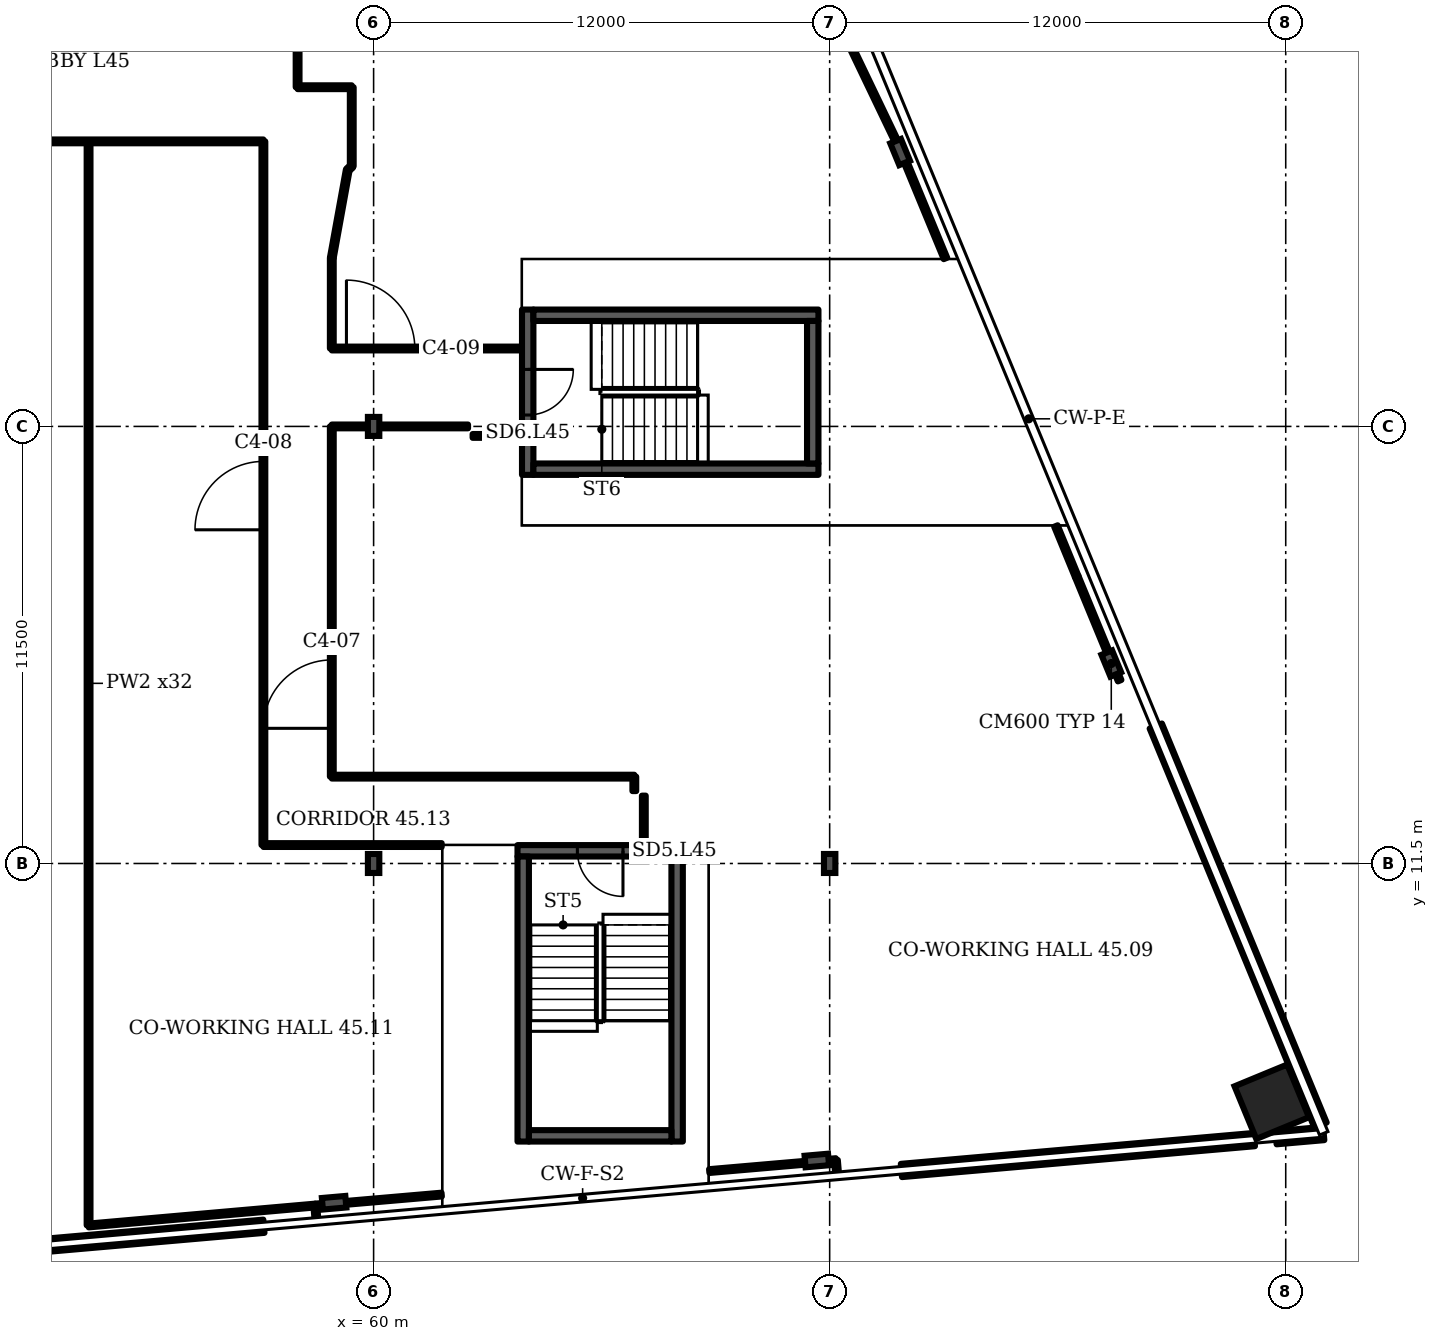
"""IFC4 building model, lengths in metres.
Left out: names, types, materials, properties, quantities, classifications, styles, units other than length and angle.
Written with IfcOpenShell. Run it as: python <this file> out.ifc"""

import sys

from ifc_helpers import new_model, si_unit, direction, frame, frame_2d, origin, origin_2d, place, context, subcontext, project, spatial, rectangle, i_section, extrude, element, fill, save


model = new_model("IFC4")
c1 = context("Model", 3, precision=1e-05, world=origin(), true_north=direction((0.0, 1.0)))
c2 = subcontext(c1, "Body", "Model", "MODEL_VIEW")
j1 = project(units=[si_unit("LENGTHUNIT", "METRE"), si_unit("PLANEANGLEUNIT", "RADIAN")], contexts=[c1])
p1 = place(None, origin())
s1 = spatial("IfcSite", under=j1, at=p1, CompositionType="ELEMENT")
p2 = place(p1, origin())
s2 = spatial("IfcBuilding", under=s1, at=p2, CompositionType="ELEMENT")
p3 = place(p2, frame((0.0, 0.0, 184.3)))
s3 = spatial("IfcBuildingStorey", under=s2, at=p3, CompositionType="ELEMENT", Elevation=184.3)
p4 = place(p3, frame((83.633, 5.231, 0.0), z_axis=(0.0, 0.0, 1.0), x_axis=(-0.381602, 0.924325, 0.0)))
e1 = element("IfcColumn", 1, at=p4, inside=s3, PredefinedType="COLUMN", context=c2, shape_type="SweptSolid", body=[
    extrude(rectangle(XDim=1.5, YDim=1.5, at=origin_2d()), origin(), (0.0, 0.0, 1.0), 3.6),
])
for number, where, z_axis, x_axis in (
    (2, (58.961, 2.573, 0.0), (0.0, 0.0, 1.0), (0.087, -0.996, 0.0)),
    (3, (71.662, 3.685, 0.0), (0.0, 0.0, 1.0), (0.087, -0.996, 0.0)),
    (4, (79.41, 16.762, 0.0), (0.0, 0.0, 1.0), (0.924, 0.382, 0.0)),
    (5, (73.854, 30.219, 0.0), (0.0, 0.0, 1.0), (0.924, 0.382, 0.0)),
):
    element("IfcColumn", number, at=place(p3, frame(where, z_axis=z_axis, x_axis=x_axis)), inside=s3, PredefinedType="COLUMN", context=c2, shape_type="SweptSolid", body=[
        extrude(i_section(OverallWidth=0.305, OverallDepth=0.62, WebThickness=0.021, FlangeThickness=0.04, FilletRadius=0.027, at=origin_2d()), origin(), (0.0, 0.0, 1.0), 3.6),
    ])
for number, where, z_axis, x_axis in (
    (6, (60.0, 11.5, 0.0), (0.0, 0.0, 1.0), (1.0, 0.0, 0.0)),
    (7, (72.0, 11.5, 0.0), (0.0, 0.0, 1.0), (1.0, 0.0, 0.0)),
    (8, (60.0, 23.0, 0.0), (0.0, 0.0, 1.0), (1.0, 0.0, 0.0)),
):
    element("IfcColumn", number, at=place(p3, frame(where, z_axis=z_axis, x_axis=x_axis)), inside=s3, PredefinedType="COLUMN", context=c2, shape_type="SweptSolid", body=[
        extrude(i_section(OverallWidth=0.3, OverallDepth=0.5, WebThickness=0.014, FlangeThickness=0.028, FilletRadius=0.027, at=origin_2d()), origin(), (0.0, 0.0, 1.0), 3.6),
    ])
p5 = place(p3, frame((46.045, 0.987, 0.0), z_axis=(0.0, 0.0, 1.0), x_axis=(0.996193, 0.087171, 0.0)))
e9 = element("IfcWall", 9, at=p5, inside=s3, PredefinedType="SOLIDWALL", context=c2, shape_type="SweptSolid", body=[
    extrude(rectangle(XDim=11.11, YDim=0.35, at=frame_2d((5.555, 0.0))), origin(), (0.0, 0.0, 1.0), 1.0),
])
p6 = place(p3, frame((73.887, 3.423, 0.0), z_axis=(0.0, 0.0, 1.0), x_axis=(0.996197, 0.087145, 0.0)))
e10 = element("IfcWall", 10, at=p6, inside=s3, PredefinedType="SOLIDWALL", context=c2, shape_type="SweptSolid", body=[
    extrude(rectangle(XDim=9.323, YDim=0.35, at=frame_2d((4.662, 0.0))), origin(), (0.0, 0.0, 1.0), 1.0),
])
p7 = place(p3, frame((83.745, 4.285, 0.0), z_axis=(0.0, 0.0, 1.0), x_axis=(0.996198, 0.087148, 0.0)))
e11 = element("IfcWall", 11, at=p7, inside=s3, PredefinedType="SOLIDWALL", context=c2, shape_type="SweptSolid", body=[
    extrude(rectangle(XDim=1.261, YDim=0.35, at=frame_2d((0.63, 0.0))), origin(), (0.0, 0.0, 1.0), 1.0),
])
p8 = place(p3, frame((84.916, 4.616, 0.0), z_axis=(0.0, 0.0, 1.0), x_axis=(-0.381598, 0.924328, 0.0)))
e12 = element("IfcWall", 12, at=p8, inside=s3, PredefinedType="SOLIDWALL", context=c2, shape_type="SweptSolid", body=[
    extrude(rectangle(XDim=11.361, YDim=0.35, at=frame_2d((5.68, 0.0))), origin(), (0.0, 0.0, 1.0), 1.0),
])
p9 = place(p3, frame((63.786, 11.834, 0.0), z_axis=(0.0, 0.0, 1.0), x_axis=(1.0, 0.0, 0.0)))
e13 = element("IfcWall", 13, at=p9, inside=s3, PredefinedType="SHEAR", context=c2, shape_type="SweptSolid", body=[
    extrude(rectangle(XDim=4.35, YDim=0.3, at=frame_2d((2.175, 0.0))), origin(), (0.0, 0.0, 1.0), 3.2),
])
p10 = place(p9, frame((1.575, 0.0, 0.0)))
e14 = element("IfcOpeningElement", 14, at=p10, cuts=e13, PredefinedType="OPENING", context=c2, shape_type="SweptSolid", body=[
    extrude(rectangle(XDim=1.2, YDim=2.1, at=frame_2d((0.6, 1.05))), frame((0.0, 0.16, 0.0), z_axis=(0.0, -1.0, 0.0), x_axis=(1.0, 0.0, 0.0)), (0.0, 0.0, 1.0), 0.32),
])
p11 = place(p3, frame((64.055, 21.725, 0.0), z_axis=(0.0, 0.0, 1.0), x_axis=(0.0, 1.0, 0.0)))
e15 = element("IfcWall", 15, at=p11, inside=s3, PredefinedType="SHEAR", context=c2, shape_type="SweptSolid", body=[
    extrude(rectangle(XDim=4.35, YDim=0.3, at=frame_2d((2.175, 0.0))), origin(), (0.0, 0.0, 1.0), 3.2),
])
p12 = place(p11, frame((1.575, 0.0, 0.0)))
e16 = element("IfcOpeningElement", 16, at=p12, cuts=e15, PredefinedType="OPENING", context=c2, shape_type="SweptSolid", body=[
    extrude(rectangle(XDim=1.2, YDim=2.1, at=frame_2d((0.6, 1.05))), frame((0.0, 0.16, 0.0), z_axis=(0.0, -1.0, 0.0), x_axis=(1.0, 0.0, 0.0)), (0.0, 0.0, 1.0), 0.32),
])
p13 = place(p3, frame((52.5, 1.98, 0.0), z_axis=(0.0, 0.0, 1.0), x_axis=(0.0, 1.0, 0.0)))
e17 = element("IfcWall", 17, at=p13, inside=s3, PredefinedType="PARTITIONING", context=c2, shape_type="SweptSolid", body=[
    extrude(rectangle(XDim=28.52, YDim=0.1, at=frame_2d((14.26, 0.0))), origin(), (0.0, 0.0, 1.0), 3.2),
])
p14 = place(p3, frame((52.5, 1.975, 0.0), z_axis=(0.0, 0.0, 1.0), x_axis=(0.99615, 0.087657, 0.0)))
e18 = element("IfcWall", 18, at=p14, inside=s3, PredefinedType="PARTITIONING", context=c2, shape_type="SweptSolid", body=[
    extrude(rectangle(XDim=5.988, YDim=0.1, at=frame_2d((2.994, 0.0))), origin(), (0.0, 0.0, 1.0), 3.2),
])
p15 = place(p3, frame((57.1, 11.985, 0.0), z_axis=(0.0, 0.0, 1.0), x_axis=(0.0, 1.0, 0.0)))
e19 = element("IfcWall", 19, at=p15, inside=s3, PredefinedType="PARTITIONING", context=c2, shape_type="SweptSolid", body=[
    extrude(rectangle(XDim=18.515, YDim=0.1, at=frame_2d((9.257, 0.0))), origin(), (0.0, 0.0, 1.0), 3.2),
])
p16 = place(p15, frame((8.295, 0.0, 0.0)))
e20 = element("IfcOpeningElement", 20, at=p16, cuts=e19, PredefinedType="OPENING", context=c2, shape_type="SweptSolid", body=[
    extrude(rectangle(XDim=1.8, YDim=2.1, at=frame_2d((0.9, 1.05))), frame((0.0, 0.06, 0.0), z_axis=(0.0, -1.0, 0.0), x_axis=(1.0, 0.0, 0.0)), (0.0, 0.0, 1.0), 0.12),
])
p17 = place(p3, frame((57.1, 11.985, 0.0), z_axis=(0.0, 0.0, 1.0), x_axis=(1.0, 0.0, 0.0)))
e21 = element("IfcWall", 21, at=p17, inside=s3, PredefinedType="PARTITIONING", context=c2, shape_type="SweptSolid", body=[
    extrude(rectangle(XDim=4.691, YDim=0.1, at=frame_2d((2.346, 0.0))), origin(), (0.0, 0.0, 1.0), 3.2),
])
p18 = place(p3, frame((58.0, 31.925, 0.0), z_axis=(0.0, 0.0, 1.0), x_axis=(0.0, 1.0, 0.0)))
e22 = element("IfcWall", 22, at=p18, inside=s3, PredefinedType="PARTITIONING", context=c2, shape_type="SweptSolid", body=[
    extrude(rectangle(XDim=2.055, YDim=0.1, at=frame_2d((1.027, 0.0))), origin(), (0.0, 0.0, 1.0), 3.2),
])
p19 = place(p3, frame((58.0, 31.925, 0.0), z_axis=(0.0, 0.0, 1.0), x_axis=(1.0, 0.0, 0.0)))
e23 = element("IfcWall", 23, at=p19, inside=s3, PredefinedType="PARTITIONING", context=c2, shape_type="SweptSolid", body=[
    extrude(rectangle(XDim=1.425, YDim=0.1, at=frame_2d((0.712, 0.0))), origin(), (0.0, 0.0, 1.0), 3.2),
])
p20 = place(p3, frame((58.465, 2.5, 0.0), z_axis=(0.0, 0.0, 1.0), x_axis=(0.996263, 0.086355, 0.0)))
e24 = element("IfcWall", 24, at=p20, inside=s3, PredefinedType="PARTITIONING", context=c2, shape_type="SweptSolid", body=[
    extrude(rectangle(XDim=3.339, YDim=0.1, at=frame_2d((1.669, 0.0))), origin(), (0.0, 0.0, 1.0), 2.58),
])
p21 = place(p3, frame((58.498, 2.102, 0.0), z_axis=(0.0, 0.0, 1.0), x_axis=(-0.083045, 0.996542, 0.0)))
e25 = element("IfcWall", 25, at=p21, inside=s3, PredefinedType="PARTITIONING", context=c2, shape_type="SweptSolid", body=[
    extrude(rectangle(XDim=0.4, YDim=0.1, at=frame_2d((0.2, 0.0))), origin(), (0.0, 0.0, 1.0), 3.2),
])
p22 = place(p3, frame((58.9, 13.785, 0.0), z_axis=(0.0, 0.0, 1.0), x_axis=(0.0, 1.0, 0.0)))
e26 = element("IfcWall", 26, at=p22, inside=s3, PredefinedType="PARTITIONING", context=c2, shape_type="SweptSolid", body=[
    extrude(rectangle(XDim=9.215, YDim=0.1, at=frame_2d((4.607, 0.0))), origin(), (0.0, 0.0, 1.0), 3.2),
])
p23 = place(p22, frame((1.271, 0.0, 0.0)))
e27 = element("IfcOpeningElement", 27, at=p23, cuts=e26, PredefinedType="OPENING", context=c2, shape_type="SweptSolid", body=[
    extrude(rectangle(XDim=1.8, YDim=2.1, at=frame_2d((0.9, 1.05))), frame((0.0, 0.06, 0.0), z_axis=(0.0, -1.0, 0.0), x_axis=(1.0, 0.0, 0.0)), (0.0, 0.0, 1.0), 0.12),
])
p24 = place(p3, frame((58.9, 13.785, 0.0), z_axis=(0.0, 0.0, 1.0), x_axis=(1.0, 0.0, 0.0)))
e28 = element("IfcWall", 28, at=p24, inside=s3, PredefinedType="PARTITIONING", context=c2, shape_type="SweptSolid", body=[
    extrude(rectangle(XDim=7.96, YDim=0.1, at=frame_2d((3.98, 0.0))), origin(), (0.0, 0.0, 1.0), 3.2),
])
p25 = place(p3, frame((58.9, 23.0, 0.0), z_axis=(0.0, 0.0, 1.0), x_axis=(1.0, 0.0, 0.0)))
e29 = element("IfcWall", 29, at=p25, inside=s3, PredefinedType="PARTITIONING", context=c2, shape_type="SweptSolid", body=[
    extrude(rectangle(XDim=3.585, YDim=0.1, at=frame_2d((1.792, 0.0))), origin(), (0.0, 0.0, 1.0), 3.2),
])
p26 = place(p3, frame((58.9, 25.05, 0.0), z_axis=(0.0, 0.0, 1.0), x_axis=(0.0, 1.0, 0.0)))
e30 = element("IfcWall", 30, at=p26, inside=s3, PredefinedType="PARTITIONING", context=c2, shape_type="SweptSolid", body=[
    extrude(rectangle(XDim=2.385, YDim=0.1, at=frame_2d((1.192, 0.0))), origin(), (0.0, 0.0, 1.0), 3.2),
])
p27 = place(p3, frame((58.9, 25.05, 0.0), z_axis=(0.0, 0.0, 1.0), x_axis=(1.0, 0.0, 0.0)))
e31 = element("IfcWall", 31, at=p27, inside=s3, PredefinedType="PARTITIONING", context=c2, shape_type="SweptSolid", body=[
    extrude(rectangle(XDim=4.985, YDim=0.1, at=frame_2d((2.492, 0.0))), origin(), (0.0, 0.0, 1.0), 3.2),
])
p28 = place(p27, frame((0.385, 0.0, 0.0)))
e32 = element("IfcOpeningElement", 32, at=p28, cuts=e31, PredefinedType="OPENING", context=c2, shape_type="SweptSolid", body=[
    extrude(rectangle(XDim=1.8, YDim=2.1, at=frame_2d((0.9, 1.05))), frame((0.0, 0.06, 0.0), z_axis=(0.0, -1.0, 0.0), x_axis=(1.0, 0.0, 0.0)), (0.0, 0.0, 1.0), 0.12),
])
p29 = place(p3, frame((58.9, 27.435, 0.0), z_axis=(0.0, 0.0, 1.0), x_axis=(0.178584, 0.983924, 0.0)))
e33 = element("IfcWall", 33, at=p29, inside=s3, PredefinedType="PARTITIONING", context=c2, shape_type="SweptSolid", body=[
    extrude(rectangle(XDim=2.353, YDim=0.1, at=frame_2d((1.176, 0.0))), origin(), (0.0, 0.0, 1.0), 3.2),
])
p30 = place(p3, frame((59.32, 29.75, 0.0), z_axis=(0.0, 0.0, 1.0), x_axis=(0.741581, 0.670872, 0.0)))
e34 = element("IfcWall", 34, at=p30, inside=s3, PredefinedType="PARTITIONING", context=c2, shape_type="SweptSolid", body=[
    extrude(rectangle(XDim=0.142, YDim=0.1, at=frame_2d((0.071, 0.0))), origin(), (0.0, 0.0, 1.0), 3.2),
])
p31 = place(p3, frame((59.425, 29.845, 0.0), z_axis=(0.0, 0.0, 1.0), x_axis=(0.0, 1.0, 0.0)))
e35 = element("IfcWall", 35, at=p31, inside=s3, PredefinedType="PARTITIONING", context=c2, shape_type="SweptSolid", body=[
    extrude(rectangle(XDim=2.08, YDim=0.1, at=frame_2d((1.04, 0.0))), origin(), (0.0, 0.0, 1.0), 3.2),
])
p32 = place(p3, frame((62.605, 22.75, 0.0), z_axis=(0.0, 0.0, 1.0), x_axis=(1.0, 0.0, 0.0)))
e36 = element("IfcWall", 36, at=p32, inside=s3, PredefinedType="PARTITIONING", context=c2, shape_type="SweptSolid", body=[
    extrude(rectangle(XDim=1.28, YDim=0.1, at=frame_2d((0.64, 0.0))), origin(), (0.0, 0.0, 1.0), 3.2),
])
p33 = place(p3, frame((66.86, 13.405, 0.0), z_axis=(0.0, 0.0, 1.0), x_axis=(0.0, 1.0, 0.0)))
e37 = element("IfcWall", 37, at=p33, inside=s3, PredefinedType="PARTITIONING", context=c2, shape_type="SweptSolid", body=[
    extrude(rectangle(XDim=0.38, YDim=0.1, at=frame_2d((0.19, 0.0))), origin(), (0.0, 0.0, 1.0), 3.2),
])
p34 = place(p3, frame((67.11, 12.004, 0.0), z_axis=(0.0, 0.0, 1.0), x_axis=(0.0, 1.0, 0.0)))
e38 = element("IfcWall", 38, at=p34, inside=s3, PredefinedType="PARTITIONING", context=c2, shape_type="SweptSolid", body=[
    extrude(rectangle(XDim=1.281, YDim=0.1, at=frame_2d((0.641, 0.0))), origin(), (0.0, 0.0, 1.0), 3.2),
])
p35 = place(p3, frame((68.831, 3.407, 0.0), z_axis=(0.0, 0.0, 1.0), x_axis=(0.996283, 0.086167, 0.0)))
e39 = element("IfcWall", 39, at=p35, inside=s3, PredefinedType="PARTITIONING", context=c2, shape_type="SweptSolid", body=[
    extrude(rectangle(XDim=3.346, YDim=0.1, at=frame_2d((1.673, 0.0))), origin(), (0.0, 0.0, 1.0), 2.58),
])
p36 = place(p3, frame((72.198, 3.3, 0.0), z_axis=(0.0, 0.0, 1.0), x_axis=(-0.083759, 0.996486, 0.0)))
e40 = element("IfcWall", 40, at=p36, inside=s3, PredefinedType="PARTITIONING", context=c2, shape_type="SweptSolid", body=[
    extrude(rectangle(XDim=0.396, YDim=0.1, at=frame_2d((0.198, 0.0))), origin(), (0.0, 0.0, 1.0), 3.2),
])
p37 = place(p3, frame((73.885, 30.23, 0.0), z_axis=(0.0, 0.0, 1.0), x_axis=(-0.432221, 0.901772, 0.0)))
e41 = element("IfcWall", 41, at=p37, inside=s3, PredefinedType="PARTITIONING", context=c2, shape_type="SweptSolid", body=[
    extrude(rectangle(XDim=12.459, YDim=0.1, at=frame_2d((6.229, 0.0))), origin(), (0.0, 0.0, 1.0), 3.2),
])
p38 = place(p3, frame((75.047, 27.42, 0.0), z_axis=(0.0, 0.0, 1.0), x_axis=(-0.382024, 0.924148, 0.0)))
e42 = element("IfcWall", 42, at=p38, inside=s3, PredefinedType="PARTITIONING", context=c2, shape_type="SweptSolid", body=[
    extrude(rectangle(XDim=3.041, YDim=0.1, at=frame_2d((1.521, 0.0))), origin(), (0.0, 0.0, 1.0), 2.58),
])
p39 = place(p3, frame((78.5, 19.05, 0.0), z_axis=(0.0, 0.0, 1.0), x_axis=(-0.380332, 0.924852, 0.0)))
e43 = element("IfcWall", 43, at=p39, inside=s3, PredefinedType="PARTITIONING", context=c2, shape_type="SweptSolid", body=[
    extrude(rectangle(XDim=1.438, YDim=0.1, at=frame_2d((0.719, 0.0))), origin(), (0.0, 0.0, 1.0), 2.58),
])
p40 = place(p3, frame((79.63, 16.31, 0.0), z_axis=(0.0, 0.0, 1.0), x_axis=(-0.381225, 0.924479, 0.0)))
e44 = element("IfcWall", 44, at=p40, inside=s3, PredefinedType="PARTITIONING", context=c2, shape_type="SweptSolid", body=[
    extrude(rectangle(XDim=2.964, YDim=0.1, at=frame_2d((1.482, 0.0))), origin(), (0.0, 0.0, 1.0), 2.58),
])
p41 = place(p3, frame((44.15, 30.5, 0.0), z_axis=(0.0, 0.0, 1.0), x_axis=(1.0, 0.0, 0.0)))
e45 = element("IfcWall", 45, at=p41, inside=s3, PredefinedType="PARTITIONING", context=c2, shape_type="SweptSolid", body=[
    extrude(rectangle(XDim=12.95, YDim=0.1, at=frame_2d((6.475, 0.0))), origin(), (0.0, 0.0, 1.0), 3.2),
])
p42 = place(p41, frame((3.17, 0.0, 0.0)))
e46 = element("IfcOpeningElement", 46, at=p42, cuts=e45, PredefinedType="OPENING", context=c2, shape_type="SweptSolid", body=[
    extrude(rectangle(XDim=1.8, YDim=2.1, at=frame_2d((0.9, 1.05))), frame((0.0, 0.06, 0.0), z_axis=(0.0, -1.0, 0.0), x_axis=(1.0, 0.0, 0.0)), (0.0, 0.0, 1.0), 0.12),
])
for number, where, z_axis, x_axis in (
    (47, (63.936, 4.184, 0.0), (0.0, 0.0, 1.0), (0.0, 1.0, 0.0)),
    (48, (67.986, 4.184, 0.0), (0.0, 0.0, 1.0), (0.0, 1.0, 0.0)),
):
    element("IfcWall", number, at=place(p3, frame(where, z_axis=z_axis, x_axis=x_axis)), inside=s3, PredefinedType="SHEAR", context=c2, shape_type="SweptSolid", body=[
        extrude(rectangle(XDim=7.5, YDim=0.3, at=frame_2d((3.75, 0.0))), origin(), (0.0, 0.0, 1.0), 3.2),
    ])
p43 = place(p3, frame((64.086, 4.334, 0.0), z_axis=(0.0, 0.0, 1.0), x_axis=(1.0, 0.0, 0.0)))
e49 = element("IfcWall", 49, at=p43, inside=s3, PredefinedType="SHEAR", context=c2, shape_type="SweptSolid", body=[
    extrude(rectangle(XDim=3.75, YDim=0.3, at=frame_2d((1.875, 0.0))), origin(), (0.0, 0.0, 1.0), 3.2),
])
for number, where, z_axis, x_axis in (
    (50, (64.205, 21.875, 0.0), (0.0, 0.0, 1.0), (1.0, 0.0, 0.0)),
    (51, (64.205, 25.925, 0.0), (0.0, 0.0, 1.0), (1.0, 0.0, 0.0)),
):
    element("IfcWall", number, at=place(p3, frame(where, z_axis=z_axis, x_axis=x_axis)), inside=s3, PredefinedType="SHEAR", context=c2, shape_type="SweptSolid", body=[
        extrude(rectangle(XDim=7.5, YDim=0.3, at=frame_2d((3.75, 0.0))), origin(), (0.0, 0.0, 1.0), 3.2),
    ])
p44 = place(p3, frame((71.555, 22.025, 0.0), z_axis=(0.0, 0.0, 1.0), x_axis=(0.0, 1.0, 0.0)))
e52 = element("IfcWall", 52, at=p44, inside=s3, PredefinedType="SHEAR", context=c2, shape_type="SweptSolid", body=[
    extrude(rectangle(XDim=3.75, YDim=0.3, at=frame_2d((1.875, 0.0))), origin(), (0.0, 0.0, 1.0), 3.2),
])
p45 = place(p10, origin())
e53 = element("IfcDoor", 53, at=p45, inside=s3, OperationType="SINGLE_SWING_RIGHT", PredefinedType="DOOR", context=c2, shape_type="SweptSolid", body=[
    extrude(rectangle(XDim=1.2, YDim=2.1, at=frame_2d((0.6, 1.05))), frame((0.0, 0.025, 0.0), z_axis=(0.0, -1.0, 0.0), x_axis=(1.0, 0.0, 0.0)), (0.0, 0.0, 1.0), 0.05),
])
fill(e14, e53)
p46 = place(p12, origin())
e54 = element("IfcDoor", 54, at=p46, inside=s3, OperationType="SINGLE_SWING_RIGHT", PredefinedType="DOOR", context=c2, shape_type="SweptSolid", body=[
    extrude(rectangle(XDim=1.2, YDim=2.1, at=frame_2d((0.6, 1.05))), frame((0.0, 0.025, 0.0), z_axis=(0.0, -1.0, 0.0), x_axis=(1.0, 0.0, 0.0)), (0.0, 0.0, 1.0), 0.05),
])
fill(e16, e54)
p47 = place(p23, origin())
e55 = element("IfcDoor", 55, at=p47, inside=s3, OperationType="DOUBLE_DOOR_SINGLE_SWING", PredefinedType="DOOR", context=c2, shape_type="SweptSolid", body=[
    extrude(rectangle(XDim=1.8, YDim=2.1, at=frame_2d((0.9, 1.05))), frame((0.0, 0.025, 0.0), z_axis=(0.0, -1.0, 0.0), x_axis=(1.0, 0.0, 0.0)), (0.0, 0.0, 1.0), 0.05),
])
fill(e27, e55)
p48 = place(p16, origin())
e56 = element("IfcDoor", 56, at=p48, inside=s3, OperationType="DOUBLE_DOOR_SINGLE_SWING", PredefinedType="DOOR", context=c2, shape_type="SweptSolid", body=[
    extrude(rectangle(XDim=1.8, YDim=2.1, at=frame_2d((0.9, 1.05))), frame((0.0, 0.025, 0.0), z_axis=(0.0, -1.0, 0.0), x_axis=(1.0, 0.0, 0.0)), (0.0, 0.0, 1.0), 0.05),
])
fill(e20, e56)
p49 = place(p28, origin())
e57 = element("IfcDoor", 57, at=p49, inside=s3, OperationType="DOUBLE_DOOR_SINGLE_SWING", PredefinedType="DOOR", context=c2, shape_type="SweptSolid", body=[
    extrude(rectangle(XDim=1.8, YDim=2.1, at=frame_2d((0.9, 1.05))), frame((0.0, 0.025, 0.0), z_axis=(0.0, -1.0, 0.0), x_axis=(1.0, 0.0, 0.0)), (0.0, 0.0, 1.0), 0.05),
])
fill(e32, e57)
save(model, sys.argv[1])
